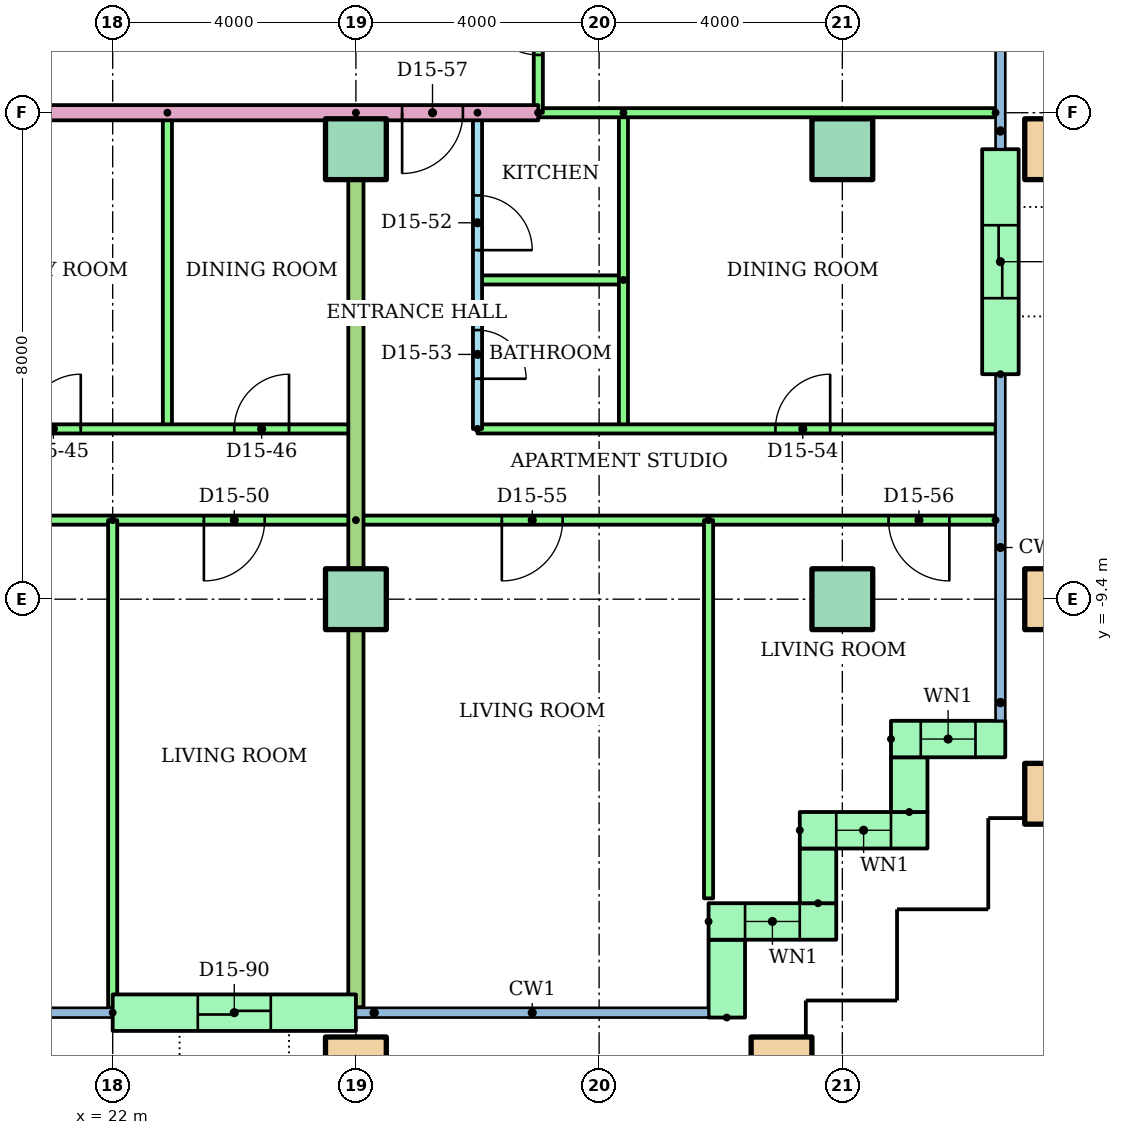
"""IFC4 building model, lengths in metres.
Left out: names, types, materials, properties, quantities, classifications, styles, units other than length and angle.
Written with IfcOpenShell. Run it as: python <this file> out.ifc"""

import sys

from ifc_helpers import new_model, si_unit, direction, frame, frame_2d, origin, origin_2d, place, context, subcontext, project, spatial, rectangle, hollow_rectangle, extrude, element, fill, save


model = new_model("IFC4")
c1 = context("Model", 3, precision=1e-05, world=origin(), true_north=direction((0.0, 1.0)))
c2 = subcontext(c1, "Body", "Model", "MODEL_VIEW")
j1 = project(units=[si_unit("LENGTHUNIT", "METRE"), si_unit("PLANEANGLEUNIT", "RADIAN")], contexts=[c1])
p1 = place(None, origin())
s1 = spatial("IfcSite", under=j1, at=p1, CompositionType="ELEMENT")
p2 = place(p1, origin())
s2 = spatial("IfcBuilding", under=s1, at=p2, CompositionType="ELEMENT")
p3 = place(p2, frame((0.0, 0.0, 57.6)))
s3 = spatial("IfcBuildingStorey", under=s2, at=p3, CompositionType="ELEMENT", Elevation=57.6)
for number, where in (
    (1, (26.0, -17.1, 0.0)),
    (2, (33.0, -17.1, 0.0)),
    (3, (37.5, -12.6, 0.0)),
):
    element("IfcColumn", number, at=place(p3, frame(where)), inside=s3, PredefinedType="COLUMN", context=c2, shape_type="SweptSolid", body=[
        extrude(hollow_rectangle(XDim=1.0, YDim=1.0, WallThickness=0.05, at=origin_2d()), origin(), (0.0, 0.0, 1.0), 3.2),
    ])
for number, where in (
    (4, (26.0, -9.4, 0.0)),
    (5, (34.0, -9.4, 0.0)),
):
    element("IfcColumn", number, at=place(p3, frame(where)), inside=s3, PredefinedType="COLUMN", context=c2, shape_type="SweptSolid", body=[
        extrude(rectangle(XDim=1.0, YDim=1.0, at=origin_2d()), origin(), (0.0, 0.0, 1.0), 3.2),
    ])
p4 = place(p3, frame((37.5, -9.4, 0.0)))
e6 = element("IfcColumn", 6, at=p4, inside=s3, PredefinedType="COLUMN", context=c2, shape_type="SweptSolid", body=[
    extrude(hollow_rectangle(XDim=1.0, YDim=1.0, WallThickness=0.05, at=origin_2d()), origin(), (0.0, 0.0, 1.0), 3.2),
])
for number, where in (
    (7, (26.0, -2.0, 0.0)),
    (8, (34.0, -2.0, 0.0)),
):
    element("IfcColumn", number, at=place(p3, frame(where)), inside=s3, PredefinedType="COLUMN", context=c2, shape_type="SweptSolid", body=[
        extrude(rectangle(XDim=1.0, YDim=1.0, at=origin_2d()), origin(), (0.0, 0.0, 1.0), 3.2),
    ])
p5 = place(p3, frame((37.5, -2.0, 0.0)))
e9 = element("IfcColumn", 9, at=p5, inside=s3, PredefinedType="COLUMN", context=c2, shape_type="SweptSolid", body=[
    extrude(hollow_rectangle(XDim=1.0, YDim=1.0, WallThickness=0.05, at=origin_2d()), origin(), (0.0, 0.0, 1.0), 3.2),
])
p6 = place(p3, frame((22.0, -16.2, 0.0)))
e10 = element("IfcWall", 10, at=p6, inside=s3, PredefinedType="STANDARD", context=c2, shape_type="SweptSolid", body=[
    extrude(rectangle(XDim=4.0, YDim=0.6, at=frame_2d((2.0, 0.0))), origin(), (0.0, 0.0, 1.0), 2.92),
])
p7 = place(p6, frame((1.4, 0.0, 0.0)))
e11 = element("IfcOpeningElement", 11, at=p7, cuts=e10, PredefinedType="OPENING", context=c2, shape_type="SweptSolid", body=[
    extrude(rectangle(XDim=1.2, YDim=2.1, at=frame_2d((0.6, 1.05))), frame((0.0, 0.31, 0.0), z_axis=(0.0, -1.0, 0.0), x_axis=(1.0, 0.0, 0.0)), (0.0, 0.0, 1.0), 0.62),
])
p8 = place(p3, frame((32.1, -16.28, 0.0), z_axis=(0.0, 0.0, 1.0), x_axis=(0.0, 1.0, 0.0)))
e12 = element("IfcWall", 12, at=p8, inside=s3, PredefinedType="STANDARD", context=c2, shape_type="SweptSolid", body=[
    extrude(rectangle(XDim=1.28, YDim=0.6, at=frame_2d((0.64, 0.0))), origin(), (0.0, 0.0, 1.0), 2.92),
])
p9 = place(p3, frame((31.8, -14.7, 0.0)))
e13 = element("IfcWall", 13, at=p9, inside=s3, PredefinedType="STANDARD", context=c2, shape_type="SweptSolid", body=[
    extrude(rectangle(XDim=2.1, YDim=0.6, at=frame_2d((1.05, 0.0))), origin(), (0.0, 0.0, 1.0), 2.92),
])
p10 = place(p9, frame((0.6, 0.0, 0.9)))
e14 = element("IfcOpeningElement", 14, at=p10, cuts=e13, PredefinedType="OPENING", context=c2, shape_type="SweptSolid", body=[
    extrude(rectangle(XDim=0.9, YDim=1.5, at=frame_2d((0.45, 0.75))), frame((0.0, 0.31, 0.0), z_axis=(0.0, -1.0, 0.0), x_axis=(1.0, 0.0, 0.0)), (0.0, 0.0, 1.0), 0.62),
])
p11 = place(p3, frame((33.6, -14.4, 0.0), z_axis=(0.0, 0.0, 1.0), x_axis=(0.0, 1.0, 0.0)))
e15 = element("IfcWall", 15, at=p11, inside=s3, PredefinedType="STANDARD", context=c2, shape_type="SweptSolid", body=[
    extrude(rectangle(XDim=0.9, YDim=0.6, at=frame_2d((0.45, 0.0))), origin(), (0.0, 0.0, 1.0), 2.92),
])
p12 = place(p3, frame((33.3, -13.2, 0.0)))
e16 = element("IfcWall", 16, at=p12, inside=s3, PredefinedType="STANDARD", context=c2, shape_type="SweptSolid", body=[
    extrude(rectangle(XDim=2.1, YDim=0.6, at=frame_2d((1.05, 0.0))), origin(), (0.0, 0.0, 1.0), 2.92),
])
p13 = place(p12, frame((0.6, 0.0, 0.9)))
e17 = element("IfcOpeningElement", 17, at=p13, cuts=e16, PredefinedType="OPENING", context=c2, shape_type="SweptSolid", body=[
    extrude(rectangle(XDim=0.9, YDim=1.5, at=frame_2d((0.45, 0.75))), frame((0.0, 0.31, 0.0), z_axis=(0.0, -1.0, 0.0), x_axis=(1.0, 0.0, 0.0)), (0.0, 0.0, 1.0), 0.62),
])
p14 = place(p3, frame((35.1, -12.9, 0.0), z_axis=(0.0, 0.0, 1.0), x_axis=(0.0, 1.0, 0.0)))
e18 = element("IfcWall", 18, at=p14, inside=s3, PredefinedType="STANDARD", context=c2, shape_type="SweptSolid", body=[
    extrude(rectangle(XDim=0.9, YDim=0.6, at=frame_2d((0.45, 0.0))), origin(), (0.0, 0.0, 1.0), 2.92),
])
p15 = place(p3, frame((34.8, -11.7, 0.0)))
e19 = element("IfcWall", 19, at=p15, inside=s3, PredefinedType="STANDARD", context=c2, shape_type="SweptSolid", body=[
    extrude(rectangle(XDim=1.88, YDim=0.6, at=frame_2d((0.94, 0.0))), origin(), (0.0, 0.0, 1.0), 2.92),
])
p16 = place(p15, frame((0.49, 0.0, 0.9)))
e20 = element("IfcOpeningElement", 20, at=p16, cuts=e19, PredefinedType="OPENING", context=c2, shape_type="SweptSolid", body=[
    extrude(rectangle(XDim=0.9, YDim=1.5, at=frame_2d((0.45, 0.75))), frame((0.0, 0.31, 0.0), z_axis=(0.0, -1.0, 0.0), x_axis=(1.0, 0.0, 0.0)), (0.0, 0.0, 1.0), 0.62),
])
p17 = place(p3, frame((36.6, -5.7, 0.0), z_axis=(0.0, 0.0, 1.0), x_axis=(0.0, 1.0, 0.0)))
e21 = element("IfcWall", 21, at=p17, inside=s3, PredefinedType="STANDARD", context=c2, shape_type="SweptSolid", body=[
    extrude(rectangle(XDim=3.7, YDim=0.6, at=frame_2d((1.85, 0.0))), origin(), (0.0, 0.0, 1.0), 2.92),
])
p18 = place(p17, frame((1.25, 0.0, 0.0)))
e22 = element("IfcOpeningElement", 22, at=p18, cuts=e21, PredefinedType="OPENING", context=c2, shape_type="SweptSolid", body=[
    extrude(rectangle(XDim=1.2, YDim=2.1, at=frame_2d((0.6, 1.05))), frame((0.0, 0.31, 0.0), z_axis=(0.0, -1.0, 0.0), x_axis=(1.0, 0.0, 0.0)), (0.0, 0.0, 1.0), 0.62),
])
p19 = place(p3, frame((22.9, -1.4, 0.0), z_axis=(0.0, 0.0, 1.0), x_axis=(0.0, -1.0, 0.0)))
e23 = element("IfcWall", 23, at=p19, inside=s3, PredefinedType="PARTITIONING", context=c2, shape_type="SweptSolid", body=[
    extrude(rectangle(XDim=5.2, YDim=0.15, at=frame_2d((2.6, 0.0))), origin(), (0.0, 0.0, 1.0), 2.4),
])
p20 = place(p3, frame((12.0, -6.6, 0.0)))
e24 = element("IfcWall", 24, at=p20, inside=s3, PredefinedType="PARTITIONING", context=c2, shape_type="SweptSolid", body=[
    extrude(rectangle(XDim=14.0, YDim=0.15, at=frame_2d((7.0, 0.0))), origin(), (0.0, 0.0, 1.0), 2.4),
])
p21 = place(p20, frame((4.325, 0.0, 0.0)))
e25 = element("IfcOpeningElement", 25, at=p21, cuts=e24, PredefinedType="OPENING", context=c2, shape_type="SweptSolid", body=[
    extrude(rectangle(XDim=0.9, YDim=2.1, at=frame_2d((0.45, 1.05))), frame((0.0, 0.085, 0.0), z_axis=(0.0, -1.0, 0.0), x_axis=(1.0, 0.0, 0.0)), (0.0, 0.0, 1.0), 0.17),
])
p22 = place(p20, frame((8.575, 0.0, 0.0)))
e26 = element("IfcOpeningElement", 26, at=p22, cuts=e24, PredefinedType="OPENING", context=c2, shape_type="SweptSolid", body=[
    extrude(rectangle(XDim=0.9, YDim=2.1, at=frame_2d((0.45, 1.05))), frame((0.0, 0.085, 0.0), z_axis=(0.0, -1.0, 0.0), x_axis=(1.0, 0.0, 0.0)), (0.0, 0.0, 1.0), 0.17),
])
p23 = place(p20, frame((12.0, 0.0, 0.0)))
e27 = element("IfcOpeningElement", 27, at=p23, cuts=e24, PredefinedType="OPENING", context=c2, shape_type="SweptSolid", body=[
    extrude(rectangle(XDim=0.9, YDim=2.1, at=frame_2d((0.45, 1.05))), frame((0.0, 0.085, 0.0), z_axis=(0.0, -1.0, 0.0), x_axis=(1.0, 0.0, 0.0)), (0.0, 0.0, 1.0), 0.17),
])
p24 = place(p3, frame((26.0, -8.1, 0.0), z_axis=(0.0, 0.0, 1.0), x_axis=(-1.0, 0.0, 0.0)))
e28 = element("IfcWall", 28, at=p24, inside=s3, PredefinedType="PARTITIONING", context=c2, shape_type="SweptSolid", body=[
    extrude(rectangle(XDim=16.0, YDim=0.15, at=frame_2d((8.0, 0.0))), origin(), (0.0, 0.0, 1.0), 2.4),
])
p25 = place(p24, frame((13.55, 0.0, 0.0)))
e29 = element("IfcOpeningElement", 29, at=p25, cuts=e28, PredefinedType="OPENING", context=c2, shape_type="SweptSolid", body=[
    extrude(rectangle(XDim=0.9, YDim=2.1, at=frame_2d((0.45, 1.05))), frame((0.0, 0.085, 0.0), z_axis=(0.0, -1.0, 0.0), x_axis=(1.0, 0.0, 0.0)), (0.0, 0.0, 1.0), 0.17),
])
p26 = place(p24, frame((9.55, 0.0, 0.0)))
e30 = element("IfcOpeningElement", 30, at=p26, cuts=e28, PredefinedType="OPENING", context=c2, shape_type="SweptSolid", body=[
    extrude(rectangle(XDim=0.9, YDim=2.1, at=frame_2d((0.45, 1.05))), frame((0.0, 0.085, 0.0), z_axis=(0.0, -1.0, 0.0), x_axis=(1.0, 0.0, 0.0)), (0.0, 0.0, 1.0), 0.17),
])
p27 = place(p24, frame((5.55, 0.0, 0.0)))
e31 = element("IfcOpeningElement", 31, at=p27, cuts=e28, PredefinedType="OPENING", context=c2, shape_type="SweptSolid", body=[
    extrude(rectangle(XDim=0.9, YDim=2.1, at=frame_2d((0.45, 1.05))), frame((0.0, 0.085, 0.0), z_axis=(0.0, -1.0, 0.0), x_axis=(1.0, 0.0, 0.0)), (0.0, 0.0, 1.0), 0.17),
])
p28 = place(p24, frame((1.5, 0.0, 0.0)))
e32 = element("IfcOpeningElement", 32, at=p28, cuts=e28, PredefinedType="OPENING", context=c2, shape_type="SweptSolid", body=[
    extrude(rectangle(XDim=1.0, YDim=2.1, at=frame_2d((0.5, 1.05))), frame((0.0, 0.085, 0.0), z_axis=(0.0, -1.0, 0.0), x_axis=(1.0, 0.0, 0.0)), (0.0, 0.0, 1.0), 0.17),
])
p29 = place(p3, frame((22.0, -8.1, 0.0), z_axis=(0.0, 0.0, 1.0), x_axis=(0.0, -1.0, 0.0)))
e33 = element("IfcWall", 33, at=p29, inside=s3, PredefinedType="PARTITIONING", context=c2, shape_type="SweptSolid", body=[
    extrude(rectangle(XDim=8.021, YDim=0.15, at=frame_2d((4.01, 0.0))), origin(), (0.0, 0.0, 1.0), 2.4),
])
p30 = place(p3, frame((28.0, -1.4, 0.0), z_axis=(0.0, 0.0, 1.0), x_axis=(0.0, -1.0, 0.0)))
e34 = element("IfcWall", 34, at=p30, inside=s3, PredefinedType="PARTITIONING", context=c2, shape_type="SweptSolid", body=[
    extrude(rectangle(XDim=5.2, YDim=0.15, at=frame_2d((2.6, 0.0))), origin(), (0.0, 0.0, 1.0), 2.4),
])
p31 = place(p30, frame((1.36, 0.0, 0.0)))
e35 = element("IfcOpeningElement", 35, at=p31, cuts=e34, PredefinedType="OPENING", context=c2, shape_type="SweptSolid", body=[
    extrude(rectangle(XDim=0.9, YDim=2.1, at=frame_2d((0.45, 1.05))), frame((0.0, 0.085, 0.0), z_axis=(0.0, -1.0, 0.0), x_axis=(1.0, 0.0, 0.0)), (0.0, 0.0, 1.0), 0.17),
])
p32 = place(p30, frame((3.575, 0.0, 0.0)))
e36 = element("IfcOpeningElement", 36, at=p32, cuts=e34, PredefinedType="OPENING", context=c2, shape_type="SweptSolid", body=[
    extrude(rectangle(XDim=0.8, YDim=2.1, at=frame_2d((0.4, 1.05))), frame((0.0, 0.085, 0.0), z_axis=(0.0, -1.0, 0.0), x_axis=(1.0, 0.0, 0.0)), (0.0, 0.0, 1.0), 0.17),
])
p33 = place(p3, frame((30.4, -4.15, 0.0), z_axis=(0.0, 0.0, 1.0), x_axis=(-1.0, 0.0, 0.0)))
e37 = element("IfcWall", 37, at=p33, inside=s3, PredefinedType="PARTITIONING", context=c2, shape_type="SweptSolid", body=[
    extrude(rectangle(XDim=2.4, YDim=0.15, at=frame_2d((1.2, 0.0))), origin(), (0.0, 0.0, 1.0), 2.4),
])
p34 = place(p3, frame((30.4, -1.4, 0.0), z_axis=(0.0, 0.0, 1.0), x_axis=(0.0, -1.0, 0.0)))
e38 = element("IfcWall", 38, at=p34, inside=s3, PredefinedType="PARTITIONING", context=c2, shape_type="SweptSolid", body=[
    extrude(rectangle(XDim=5.2, YDim=0.15, at=frame_2d((2.6, 0.0))), origin(), (0.0, 0.0, 1.0), 2.4),
])
p35 = place(p3, frame((28.0, -6.6, 0.0)))
e39 = element("IfcWall", 39, at=p35, inside=s3, PredefinedType="PARTITIONING", context=c2, shape_type="SweptSolid", body=[
    extrude(rectangle(XDim=8.52, YDim=0.15, at=frame_2d((4.26, 0.0))), origin(), (0.0, 0.0, 1.0), 2.4),
])
p36 = place(p35, frame((4.9, 0.0, 0.0)))
e40 = element("IfcOpeningElement", 40, at=p36, cuts=e39, PredefinedType="OPENING", context=c2, shape_type="SweptSolid", body=[
    extrude(rectangle(XDim=0.9, YDim=2.1, at=frame_2d((0.45, 1.05))), frame((0.0, 0.085, 0.0), z_axis=(0.0, -1.0, 0.0), x_axis=(1.0, 0.0, 0.0)), (0.0, 0.0, 1.0), 0.17),
])
p37 = place(p3, frame((36.52, -8.1, 0.0), z_axis=(0.0, 0.0, 1.0), x_axis=(-1.0, 0.0, 0.0)))
e41 = element("IfcWall", 41, at=p37, inside=s3, PredefinedType="PARTITIONING", context=c2, shape_type="SweptSolid", body=[
    extrude(rectangle(XDim=10.52, YDim=0.15, at=frame_2d((5.26, 0.0))), origin(), (0.0, 0.0, 1.0), 2.4),
])
p38 = place(p37, frame((7.12, 0.0, 0.0)))
e42 = element("IfcOpeningElement", 42, at=p38, cuts=e41, PredefinedType="OPENING", context=c2, shape_type="SweptSolid", body=[
    extrude(rectangle(XDim=1.0, YDim=2.1, at=frame_2d((0.5, 1.05))), frame((0.0, 0.085, 0.0), z_axis=(0.0, -1.0, 0.0), x_axis=(1.0, 0.0, 0.0)), (0.0, 0.0, 1.0), 0.17),
])
p39 = place(p37, frame((0.76, 0.0, 0.0)))
e43 = element("IfcOpeningElement", 43, at=p39, cuts=e41, PredefinedType="OPENING", context=c2, shape_type="SweptSolid", body=[
    extrude(rectangle(XDim=1.0, YDim=2.1, at=frame_2d((0.5, 1.05))), frame((0.0, 0.085, 0.0), z_axis=(0.0, -1.0, 0.0), x_axis=(1.0, 0.0, 0.0)), (0.0, 0.0, 1.0), 0.17),
])
p40 = place(p3, frame((31.8, -8.1, 0.0), z_axis=(0.0, 0.0, 1.0), x_axis=(0.0, -1.0, 0.0)))
e44 = element("IfcWall", 44, at=p40, inside=s3, PredefinedType="PARTITIONING", context=c2, shape_type="SweptSolid", body=[
    extrude(rectangle(XDim=6.22, YDim=0.15, at=frame_2d((3.11, 0.0))), origin(), (0.0, 0.0, 1.0), 2.4),
])
p41 = place(p3, frame((26.0, -1.4, 0.0), z_axis=(0.0, 0.0, 1.0), x_axis=(0.0, -1.0, 0.0)))
e45 = element("IfcWall", 45, at=p41, inside=s3, PredefinedType="PARTITIONING", context=c2, shape_type="SweptSolid", body=[
    extrude(rectangle(XDim=14.71, YDim=0.25, at=frame_2d((7.355, 0.0))), origin(), (0.0, 0.0, 1.0), 2.4),
])
p42 = place(p3, frame((29.0, -1.4, 0.0), z_axis=(0.0, 0.0, 1.0), x_axis=(-1.0, 0.0, 0.0)))
e46 = element("IfcWall", 46, at=p42, inside=s3, PredefinedType="PARTITIONING", context=c2, shape_type="SweptSolid", body=[
    extrude(rectangle(XDim=15.0, YDim=0.25, at=frame_2d((7.5, 0.0))), origin(), (0.0, 0.0, 1.0), 2.4),
])
p43 = place(p42, frame((1.24, 0.0, 0.0)))
e47 = element("IfcOpeningElement", 47, at=p43, cuts=e46, PredefinedType="OPENING", context=c2, shape_type="SweptSolid", body=[
    extrude(rectangle(XDim=1.0, YDim=2.1, at=frame_2d((0.5, 1.05))), frame((0.0, 0.135, 0.0), z_axis=(0.0, -1.0, 0.0), x_axis=(1.0, 0.0, 0.0)), (0.0, 0.0, 1.0), 0.27),
])
p44 = place(p3, frame((36.52, -1.4, 0.0), z_axis=(0.0, 0.0, 1.0), x_axis=(-1.0, 0.0, 0.0)))
e48 = element("IfcWall", 48, at=p44, inside=s3, PredefinedType="PARTITIONING", context=c2, shape_type="SweptSolid", body=[
    extrude(rectangle(XDim=7.52, YDim=0.15, at=frame_2d((3.76, 0.0))), origin(), (0.0, 0.0, 1.0), 2.4),
])
p45 = place(p3, frame((29.0, -1.4, 0.0), z_axis=(0.0, 0.0, 1.0), x_axis=(0.0, 1.0, 0.0)))
e49 = element("IfcWall", 49, at=p45, inside=s3, PredefinedType="PARTITIONING", context=c2, shape_type="SweptSolid", body=[
    extrude(rectangle(XDim=2.8, YDim=0.15, at=frame_2d((1.4, 0.0))), origin(), (0.0, 0.0, 1.0), 2.4),
])
p46 = place(p45, frame((0.95, 0.0, 0.0)))
e50 = element("IfcOpeningElement", 50, at=p46, cuts=e49, PredefinedType="OPENING", context=c2, shape_type="SweptSolid", body=[
    extrude(rectangle(XDim=0.9, YDim=2.1, at=frame_2d((0.45, 1.05))), frame((0.0, 0.085, 0.0), z_axis=(0.0, -1.0, 0.0), x_axis=(1.0, 0.0, 0.0)), (0.0, 0.0, 1.0), 0.17),
])
p47 = place(p10, origin())
e51 = element("IfcWindow", 51, at=p47, inside=s3, PartitioningType="SINGLE_PANEL", PredefinedType="WINDOW", context=c2, shape_type="SweptSolid", body=[
    extrude(rectangle(XDim=0.9, YDim=1.5, at=frame_2d((0.45, 0.75))), frame((0.0, 0.03, 0.0), z_axis=(0.0, -1.0, 0.0), x_axis=(1.0, 0.0, 0.0)), (0.0, 0.0, 1.0), 0.06),
])
fill(e14, e51)
p48 = place(p13, origin())
e52 = element("IfcWindow", 52, at=p48, inside=s3, PartitioningType="SINGLE_PANEL", PredefinedType="WINDOW", context=c2, shape_type="SweptSolid", body=[
    extrude(rectangle(XDim=0.9, YDim=1.5, at=frame_2d((0.45, 0.75))), frame((0.0, 0.03, 0.0), z_axis=(0.0, -1.0, 0.0), x_axis=(1.0, 0.0, 0.0)), (0.0, 0.0, 1.0), 0.06),
])
fill(e17, e52)
p49 = place(p16, origin())
e53 = element("IfcWindow", 53, at=p49, inside=s3, PartitioningType="SINGLE_PANEL", PredefinedType="WINDOW", context=c2, shape_type="SweptSolid", body=[
    extrude(rectangle(XDim=0.9, YDim=1.5, at=frame_2d((0.45, 0.75))), frame((0.0, 0.03, 0.0), z_axis=(0.0, -1.0, 0.0), x_axis=(1.0, 0.0, 0.0)), (0.0, 0.0, 1.0), 0.06),
])
fill(e20, e53)
p50 = place(p22, origin())
e54 = element("IfcDoor", 54, at=p50, inside=s3, OperationType="SINGLE_SWING_RIGHT", PredefinedType="DOOR", context=c2, shape_type="SweptSolid", body=[
    extrude(rectangle(XDim=0.9, YDim=2.1, at=frame_2d((0.45, 1.05))), frame((0.0, 0.025, 0.0), z_axis=(0.0, -1.0, 0.0), x_axis=(1.0, 0.0, 0.0)), (0.0, 0.0, 1.0), 0.05),
])
fill(e26, e54)
p51 = place(p23, origin())
e55 = element("IfcDoor", 55, at=p51, inside=s3, OperationType="SINGLE_SWING_RIGHT", PredefinedType="DOOR", context=c2, shape_type="SweptSolid", body=[
    extrude(rectangle(XDim=0.9, YDim=2.1, at=frame_2d((0.45, 1.05))), frame((0.0, 0.025, 0.0), z_axis=(0.0, -1.0, 0.0), x_axis=(1.0, 0.0, 0.0)), (0.0, 0.0, 1.0), 0.05),
])
fill(e27, e55)
p52 = place(p28, origin())
e56 = element("IfcDoor", 56, at=p52, inside=s3, OperationType="SINGLE_SWING_RIGHT", PredefinedType="DOOR", context=c2, shape_type="SweptSolid", body=[
    extrude(rectangle(XDim=1.0, YDim=2.1, at=frame_2d((0.5, 1.05))), frame((0.0, 0.025, 0.0), z_axis=(0.0, -1.0, 0.0), x_axis=(1.0, 0.0, 0.0)), (0.0, 0.0, 1.0), 0.05),
])
fill(e32, e56)
p53 = place(p31, origin())
e57 = element("IfcDoor", 57, at=p53, inside=s3, OperationType="SINGLE_SWING_RIGHT", PredefinedType="DOOR", context=c2, shape_type="SweptSolid", body=[
    extrude(rectangle(XDim=0.9, YDim=2.1, at=frame_2d((0.45, 1.05))), frame((0.0, 0.025, 0.0), z_axis=(0.0, -1.0, 0.0), x_axis=(1.0, 0.0, 0.0)), (0.0, 0.0, 1.0), 0.05),
])
fill(e35, e57)
p54 = place(p32, origin())
e58 = element("IfcDoor", 58, at=p54, inside=s3, OperationType="SINGLE_SWING_RIGHT", PredefinedType="DOOR", context=c2, shape_type="SweptSolid", body=[
    extrude(rectangle(XDim=0.8, YDim=2.1, at=frame_2d((0.4, 1.05))), frame((0.0, 0.025, 0.0), z_axis=(0.0, -1.0, 0.0), x_axis=(1.0, 0.0, 0.0)), (0.0, 0.0, 1.0), 0.05),
])
fill(e36, e58)
p55 = place(p36, origin())
e59 = element("IfcDoor", 59, at=p55, inside=s3, OperationType="SINGLE_SWING_RIGHT", PredefinedType="DOOR", context=c2, shape_type="SweptSolid", body=[
    extrude(rectangle(XDim=0.9, YDim=2.1, at=frame_2d((0.45, 1.05))), frame((0.0, 0.025, 0.0), z_axis=(0.0, -1.0, 0.0), x_axis=(1.0, 0.0, 0.0)), (0.0, 0.0, 1.0), 0.05),
])
fill(e40, e59)
p56 = place(p38, origin())
e60 = element("IfcDoor", 60, at=p56, inside=s3, OperationType="SINGLE_SWING_RIGHT", PredefinedType="DOOR", context=c2, shape_type="SweptSolid", body=[
    extrude(rectangle(XDim=1.0, YDim=2.1, at=frame_2d((0.5, 1.05))), frame((0.0, 0.025, 0.0), z_axis=(0.0, -1.0, 0.0), x_axis=(1.0, 0.0, 0.0)), (0.0, 0.0, 1.0), 0.05),
])
fill(e42, e60)
p57 = place(p39, origin())
e61 = element("IfcDoor", 61, at=p57, inside=s3, OperationType="SINGLE_SWING_LEFT", PredefinedType="DOOR", context=c2, shape_type="SweptSolid", body=[
    extrude(rectangle(XDim=1.0, YDim=2.1, at=frame_2d((0.5, 1.05))), frame((0.0, 0.025, 0.0), z_axis=(0.0, -1.0, 0.0), x_axis=(1.0, 0.0, 0.0)), (0.0, 0.0, 1.0), 0.05),
])
fill(e43, e61)
p58 = place(p43, origin())
e62 = element("IfcDoor", 62, at=p58, inside=s3, OperationType="SINGLE_SWING_RIGHT", PredefinedType="DOOR", context=c2, shape_type="SweptSolid", body=[
    extrude(rectangle(XDim=1.0, YDim=2.1, at=frame_2d((0.5, 1.05))), frame((0.0, 0.025, 0.0), z_axis=(0.0, -1.0, 0.0), x_axis=(1.0, 0.0, 0.0)), (0.0, 0.0, 1.0), 0.05),
])
fill(e47, e62)
p59 = place(p46, origin())
e63 = element("IfcDoor", 63, at=p59, inside=s3, OperationType="SINGLE_SWING_RIGHT", PredefinedType="DOOR", context=c2, shape_type="SweptSolid", body=[
    extrude(rectangle(XDim=0.9, YDim=2.1, at=frame_2d((0.45, 1.05))), frame((0.0, 0.025, 0.0), z_axis=(0.0, -1.0, 0.0), x_axis=(1.0, 0.0, 0.0)), (0.0, 0.0, 1.0), 0.05),
])
fill(e50, e63)
p60 = place(p7, origin())
e64 = element("IfcDoor", 64, at=p60, inside=s3, OperationType="SLIDING_TO_LEFT", PredefinedType="DOOR", context=c2, shape_type="SweptSolid", body=[
    extrude(rectangle(XDim=1.2, YDim=2.1, at=frame_2d((0.6, 1.05))), frame((0.0, 0.025, 0.0), z_axis=(0.0, -1.0, 0.0), x_axis=(1.0, 0.0, 0.0)), (0.0, 0.0, 1.0), 0.05),
])
fill(e11, e64)
p61 = place(p18, origin())
e65 = element("IfcDoor", 65, at=p61, inside=s3, OperationType="SLIDING_TO_LEFT", PredefinedType="DOOR", context=c2, shape_type="SweptSolid", body=[
    extrude(rectangle(XDim=1.2, YDim=2.1, at=frame_2d((0.6, 1.05))), frame((0.0, 0.025, 0.0), z_axis=(0.0, -1.0, 0.0), x_axis=(1.0, 0.0, 0.0)), (0.0, 0.0, 1.0), 0.05),
])
fill(e22, e65)
save(model, sys.argv[1])
